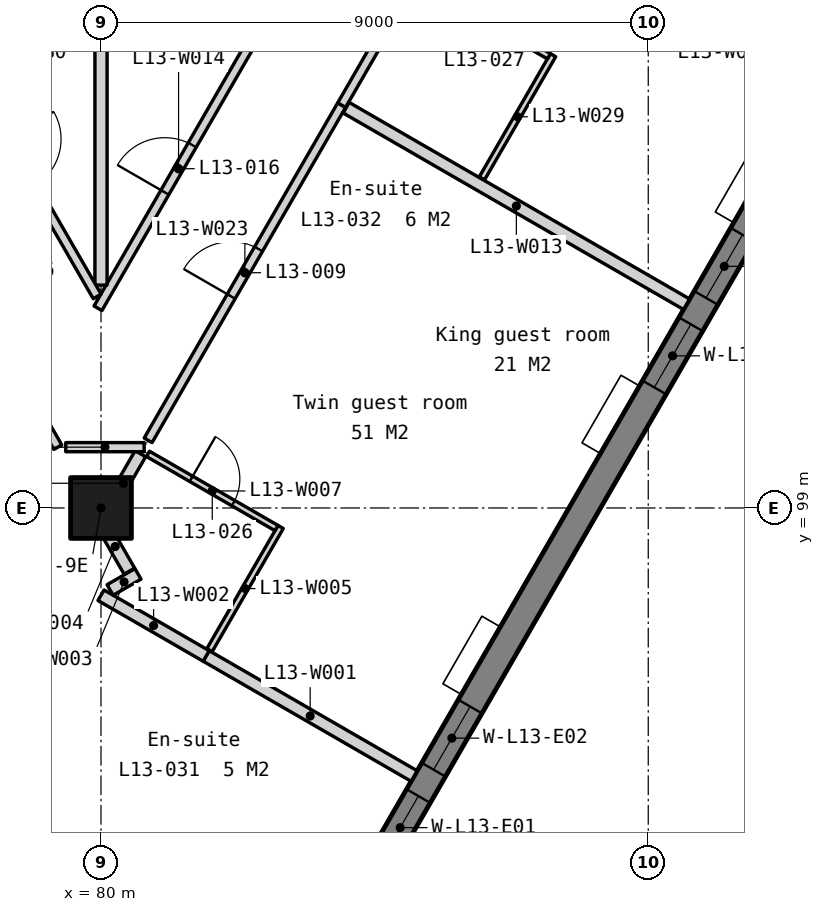
"""IFC4 building model, lengths in metres.
Left out: names, types, materials, properties, quantities, classifications, styles, units other than length and angle.
Written with IfcOpenShell. Run it as: python <this file> out.ifc"""

import sys

from ifc_helpers import new_model, si_unit, direction, frame, frame_2d, origin, origin_2d, place, context, subcontext, project, spatial, polyline, rectangle, outline, extrude, element, fill, save


model = new_model("IFC4")
c1 = context("Model", 3, precision=1e-05, world=origin(), true_north=direction((0.0, 1.0)))
c2 = subcontext(c1, "Body", "Model", "MODEL_VIEW")
j1 = project(units=[si_unit("LENGTHUNIT", "METRE"), si_unit("PLANEANGLEUNIT", "RADIAN")], contexts=[c1])
p1 = place(None, origin())
s1 = spatial("IfcSite", under=j1, at=p1, CompositionType="ELEMENT")
p2 = place(p1, origin())
s2 = spatial("IfcBuilding", under=s1, at=p2, CompositionType="ELEMENT")
p3 = place(p2, frame((0.0, 0.0, 59.5)))
s3 = spatial("IfcBuildingStorey", under=s2, at=p3, CompositionType="ELEMENT", Elevation=59.5)
p4 = place(p3, frame((80.0, 99.0, 0.0), z_axis=(0.0, 0.0, 1.0), x_axis=(1.0, 0.0, 0.0)))
e1 = element("IfcColumn", 1, at=p4, inside=s3, PredefinedType="COLUMN", context=c2, shape_type="SweptSolid", body=[
    extrude(rectangle(XDim=1.0, YDim=1.0, at=origin_2d()), origin(), (0.0, 0.0, 1.0), 3.5),
])
p5 = place(p3, frame((83.105, 90.599, -0.15), z_axis=(0.0, 0.0, 1.0), x_axis=(0.499999201451, 0.866025864826, 0.0)))
e2 = element("IfcWall", 2, at=p5, inside=s3, PredefinedType="SOLIDWALL", context=c2, shape_type="SweptSolid", body=[
    extrude(outline(polyline([(44.8, 0.0), (44.8, 3.5), (0.0, 3.5), (0.0, 0.0), (44.8, 0.0)])), frame((0.0, 0.225, 0.0), z_axis=(0.0, -1.0, 0.0), x_axis=(1.0, 0.0, 0.0)), (0.0, 0.0, 1.0), 0.45),
])
p6 = place(p5, frame((3.03, 0.0, 1.05)))
e3 = element("IfcOpeningElement", 3, at=p6, cuts=e2, PredefinedType="OPENING", context=c2, shape_type="SweptSolid", body=[
    extrude(rectangle(XDim=1.2, YDim=1.5, at=frame_2d((0.6, 0.75))), frame((0.0, 0.235, 0.0), z_axis=(0.0, -1.0, 0.0), x_axis=(1.0, 0.0, 0.0)), (0.0, 0.0, 1.0), 0.47),
])
p7 = place(p5, frame((4.73, 0.0, 1.05)))
e4 = element("IfcOpeningElement", 4, at=p7, cuts=e2, PredefinedType="OPENING", context=c2, shape_type="SweptSolid", body=[
    extrude(rectangle(XDim=1.2, YDim=1.5, at=frame_2d((0.6, 0.75))), frame((0.0, 0.235, 0.0), z_axis=(0.0, -1.0, 0.0), x_axis=(1.0, 0.0, 0.0)), (0.0, 0.0, 1.0), 0.47),
])
p8 = place(p5, frame((11.99, 0.0, 1.05)))
e5 = element("IfcOpeningElement", 5, at=p8, cuts=e2, PredefinedType="OPENING", context=c2, shape_type="SweptSolid", body=[
    extrude(rectangle(XDim=1.2, YDim=1.5, at=frame_2d((0.6, 0.75))), frame((0.0, 0.235, 0.0), z_axis=(0.0, -1.0, 0.0), x_axis=(1.0, 0.0, 0.0)), (0.0, 0.0, 1.0), 0.47),
])
p9 = place(p5, frame((13.69, 0.0, 1.05)))
e6 = element("IfcOpeningElement", 6, at=p9, cuts=e2, PredefinedType="OPENING", context=c2, shape_type="SweptSolid", body=[
    extrude(rectangle(XDim=1.2, YDim=1.5, at=frame_2d((0.6, 0.75))), frame((0.0, 0.235, 0.0), z_axis=(0.0, -1.0, 0.0), x_axis=(1.0, 0.0, 0.0)), (0.0, 0.0, 1.0), 0.47),
])
p10 = place(p5, frame((20.95, 0.0, 1.05)))
e7 = element("IfcOpeningElement", 7, at=p10, cuts=e2, PredefinedType="OPENING", context=c2, shape_type="SweptSolid", body=[
    extrude(rectangle(XDim=1.2, YDim=1.5, at=frame_2d((0.6, 0.75))), frame((0.0, 0.235, 0.0), z_axis=(0.0, -1.0, 0.0), x_axis=(1.0, 0.0, 0.0)), (0.0, 0.0, 1.0), 0.47),
])
p11 = place(p5, frame((22.65, 0.0, 1.05)))
e8 = element("IfcOpeningElement", 8, at=p11, cuts=e2, PredefinedType="OPENING", context=c2, shape_type="SweptSolid", body=[
    extrude(rectangle(XDim=1.2, YDim=1.5, at=frame_2d((0.6, 0.75))), frame((0.0, 0.235, 0.0), z_axis=(0.0, -1.0, 0.0), x_axis=(1.0, 0.0, 0.0)), (0.0, 0.0, 1.0), 0.47),
])
p12 = place(p5, frame((29.91, 0.0, 1.05)))
e9 = element("IfcOpeningElement", 9, at=p12, cuts=e2, PredefinedType="OPENING", context=c2, shape_type="SweptSolid", body=[
    extrude(rectangle(XDim=1.2, YDim=1.5, at=frame_2d((0.6, 0.75))), frame((0.0, 0.235, 0.0), z_axis=(0.0, -1.0, 0.0), x_axis=(1.0, 0.0, 0.0)), (0.0, 0.0, 1.0), 0.47),
])
p13 = place(p5, frame((31.61, 0.0, 1.05)))
e10 = element("IfcOpeningElement", 10, at=p13, cuts=e2, PredefinedType="OPENING", context=c2, shape_type="SweptSolid", body=[
    extrude(rectangle(XDim=1.2, YDim=1.5, at=frame_2d((0.6, 0.75))), frame((0.0, 0.235, 0.0), z_axis=(0.0, -1.0, 0.0), x_axis=(1.0, 0.0, 0.0)), (0.0, 0.0, 1.0), 0.47),
])
p14 = place(p5, frame((38.87, 0.0, 1.05)))
e11 = element("IfcOpeningElement", 11, at=p14, cuts=e2, PredefinedType="OPENING", context=c2, shape_type="SweptSolid", body=[
    extrude(rectangle(XDim=1.2, YDim=1.5, at=frame_2d((0.6, 0.75))), frame((0.0, 0.235, 0.0), z_axis=(0.0, -1.0, 0.0), x_axis=(1.0, 0.0, 0.0)), (0.0, 0.0, 1.0), 0.47),
])
p15 = place(p5, frame((40.57, 0.0, 1.05)))
e12 = element("IfcOpeningElement", 12, at=p15, cuts=e2, PredefinedType="OPENING", context=c2, shape_type="SweptSolid", body=[
    extrude(rectangle(XDim=1.2, YDim=1.5, at=frame_2d((0.6, 0.75))), frame((0.0, 0.235, 0.0), z_axis=(0.0, -1.0, 0.0), x_axis=(1.0, 0.0, 0.0)), (0.0, 0.0, 1.0), 0.47),
])
p16 = place(p3, frame((81.729, 96.566, 0.0), z_axis=(0.0, 0.0, 1.0), x_axis=(0.866020906874, -0.500007788796, 0.0)))
e13 = element("IfcWall", 13, at=p16, inside=s3, PredefinedType="PARTITIONING", context=c2, shape_type="SweptSolid", body=[
    extrude(rectangle(XDim=3.95, YDim=0.2, at=frame_2d((1.975, 0.0))), origin(), (0.0, 0.0, 1.0), 3.35),
])
p17 = place(p3, frame((80.0, 97.565, 0.0), z_axis=(0.0, 0.0, 1.0), x_axis=(0.866022720283, -0.500004647933, 0.0)))
e14 = element("IfcWall", 14, at=p17, inside=s3, PredefinedType="PARTITIONING", context=c2, shape_type="SweptSolid", body=[
    extrude(rectangle(XDim=1.997, YDim=0.2, at=frame_2d((0.999, 0.0))), origin(), (0.0, 0.0, 1.0), 3.35),
])
p18 = place(p3, frame((80.15, 97.651, 0.0), z_axis=(0.0, 0.0, 1.0), x_axis=(0.866078079006, 0.499908752739, 0.0)))
e15 = element("IfcWall", 15, at=p18, inside=s3, PredefinedType="PARTITIONING", context=c2, shape_type="SweptSolid", body=[
    extrude(rectangle(XDim=0.529, YDim=0.2, at=frame_2d((0.265, 0.0))), origin(), (0.0, 0.0, 1.0), 3.35),
])
p19 = place(p3, frame((80.0, 98.771, 0.0), z_axis=(0.0, 0.0, 1.0), x_axis=(0.499624422845, -0.866242134797, 0.0)))
e16 = element("IfcWall", 16, at=p19, inside=s3, PredefinedType="PARTITIONING", context=c2, shape_type="SweptSolid", body=[
    extrude(rectangle(XDim=0.934, YDim=0.2, at=frame_2d((0.467, 0.0))), origin(), (0.0, 0.0, 1.0), 3.35),
])
p20 = place(p3, frame((81.784, 96.661, 0.0), z_axis=(0.0, 0.0, 1.0), x_axis=(0.500077683152, 0.86598054875, 0.0)))
e17 = element("IfcWall", 17, at=p20, inside=s3, PredefinedType="PARTITIONING", context=c2, shape_type="SweptSolid", body=[
    extrude(rectangle(XDim=2.34, YDim=0.1, at=frame_2d((1.17, 0.0))), origin(), (0.0, 0.0, 1.0), 3.35),
])
p21 = place(p3, frame((80.087, 98.921, 0.0), z_axis=(0.0, 0.0, 1.0), x_axis=(0.499929606556, 0.866066041644, 0.0)))
e18 = element("IfcWall", 18, at=p21, inside=s3, PredefinedType="PARTITIONING", context=c2, shape_type="SweptSolid", body=[
    extrude(rectangle(XDim=1.122, YDim=0.2, at=frame_2d((0.561, 0.0))), origin(), (0.0, 0.0, 1.0), 3.35),
])
p22 = place(p3, frame((80.773, 99.89, 0.0), z_axis=(0.0, 0.0, 1.0), x_axis=(0.865980627057, -0.500077547548, 0.0)))
e19 = element("IfcWall", 19, at=p22, inside=s3, PredefinedType="PARTITIONING", context=c2, shape_type="SweptSolid", body=[
    extrude(rectangle(XDim=2.44, YDim=0.1, at=frame_2d((1.22, 0.0))), origin(), (0.0, 0.0, 1.0), 3.35),
])
p23 = place(p22, frame((0.82, 0.0, 0.0)))
e20 = element("IfcOpeningElement", 20, at=p23, cuts=e19, PredefinedType="OPENING", context=c2, shape_type="SweptSolid", body=[
    extrude(rectangle(XDim=0.8, YDim=2.1, at=frame_2d((0.4, 1.05))), frame((0.0, 0.06, 0.0), z_axis=(0.0, -1.0, 0.0), x_axis=(1.0, 0.0, 0.0)), (0.0, 0.0, 1.0), 0.12),
])
p24 = place(p3, frame((76.042, 105.626, 0.0), z_axis=(0.0, 0.0, 1.0), x_axis=(0.499991405182, -0.866030365948, 0.0)))
e21 = element("IfcWall", 21, at=p24, inside=s3, PredefinedType="PARTITIONING", context=c2, shape_type="SweptSolid", body=[
    extrude(rectangle(XDim=6.496, YDim=0.15, at=frame_2d((3.248, 0.0))), origin(), (0.0, 0.0, 1.0), 3.35),
])
p25 = place(p24, frame((2.798, 0.0, 0.0)))
e22 = element("IfcOpeningElement", 22, at=p25, cuts=e21, PredefinedType="OPENING", context=c2, shape_type="SweptSolid", body=[
    extrude(rectangle(XDim=0.9, YDim=2.1, at=frame_2d((0.45, 1.05))), frame((0.0, 0.085, 0.0), z_axis=(0.0, -1.0, 0.0), x_axis=(1.0, 0.0, 0.0)), (0.0, 0.0, 1.0), 0.17),
])
p26 = place(p3, frame((79.42, 100.0, 0.0), z_axis=(0.0, 0.0, 1.0), x_axis=(0.999999982085, -0.000189286387, 0.0)))
e23 = element("IfcWall", 23, at=p26, inside=s3, PredefinedType="PARTITIONING", context=c2, shape_type="SweptSolid", body=[
    extrude(rectangle(XDim=1.29, YDim=0.15, at=frame_2d((0.645, 0.0))), origin(), (0.0, 0.0, 1.0), 3.35),
])
p27 = place(p3, frame((84.031, 105.583, 0.0), z_axis=(0.0, 0.0, 1.0), x_axis=(0.866015162859, -0.500017737384, 0.0)))
e24 = element("IfcWall", 24, at=p27, inside=s3, PredefinedType="PARTITIONING", context=c2, shape_type="SweptSolid", body=[
    extrude(rectangle(XDim=6.465, YDim=0.2, at=frame_2d((3.232, 0.0))), origin(), (0.0, 0.0, 1.0), 3.35),
])
p28 = place(p3, frame((79.95, 102.284, 0.0), z_axis=(0.0, 0.0, 1.0), x_axis=(0.500026712466, 0.866009980786, 0.0)))
e25 = element("IfcWall", 25, at=p28, inside=s3, PredefinedType="PARTITIONING", context=c2, shape_type="SweptSolid", body=[
    extrude(rectangle(XDim=5.302, YDim=0.15, at=frame_2d((2.651, 0.0))), origin(), (0.0, 0.0, 1.0), 3.35),
])
p29 = place(p28, frame((2.201, 0.0, 0.0)))
e26 = element("IfcOpeningElement", 26, at=p29, cuts=e25, PredefinedType="OPENING", context=c2, shape_type="SweptSolid", body=[
    extrude(rectangle(XDim=0.9, YDim=2.1, at=frame_2d((0.45, 1.05))), frame((0.0, 0.085, 0.0), z_axis=(0.0, -1.0, 0.0), x_axis=(1.0, 0.0, 0.0)), (0.0, 0.0, 1.0), 0.17),
])
p30 = place(p3, frame((80.0, 102.666, 0.0), z_axis=(0.0, 0.0, 1.0), x_axis=(0.0, 1.0, 0.0)))
e27 = element("IfcWall", 27, at=p30, inside=s3, PredefinedType="PARTITIONING", context=c2, shape_type="SweptSolid", body=[
    extrude(rectangle(XDim=15.01, YDim=0.2, at=frame_2d((7.505, 0.0))), origin(), (0.0, 0.0, 1.0), 2.801),
])
p31 = place(p3, frame((80.775, 100.113, 0.0), z_axis=(0.0, 0.0, 1.0), x_axis=(0.5000079448, 0.866020816803, 0.0)))
e28 = element("IfcWall", 28, at=p31, inside=s3, PredefinedType="PARTITIONING", context=c2, shape_type="SweptSolid", body=[
    extrude(rectangle(XDim=6.366, YDim=0.15, at=frame_2d((3.183, 0.0))), origin(), (0.0, 0.0, 1.0), 3.35),
])
p32 = place(p31, frame((2.733, 0.0, 0.0)))
e29 = element("IfcOpeningElement", 29, at=p32, cuts=e28, PredefinedType="OPENING", context=c2, shape_type="SweptSolid", body=[
    extrude(rectangle(XDim=0.9, YDim=2.1, at=frame_2d((0.45, 1.05))), frame((0.0, 0.085, 0.0), z_axis=(0.0, -1.0, 0.0), x_axis=(1.0, 0.0, 0.0)), (0.0, 0.0, 1.0), 0.17),
])
p33 = place(p3, frame((83.958, 105.626, 0.0), z_axis=(0.0, 0.0, 1.0), x_axis=(0.500001309137, 0.866024647952, 0.0)))
e30 = element("IfcWall", 30, at=p33, inside=s3, PredefinedType="PARTITIONING", context=c2, shape_type="SweptSolid", body=[
    extrude(rectangle(XDim=2.4, YDim=0.15, at=frame_2d((1.2, 0.0))), origin(), (0.0, 0.0, 1.0), 3.35),
])
p34 = place(p3, frame((88.623, 108.105, 0.0), z_axis=(0.0, 0.0, 1.0), x_axis=(0.866022959057, -0.500004234368, 0.0)))
e31 = element("IfcWall", 31, at=p34, inside=s3, PredefinedType="PARTITIONING", context=c2, shape_type="SweptSolid", body=[
    extrude(rectangle(XDim=3.75, YDim=0.2, at=frame_2d((1.875, 0.0))), origin(), (0.0, 0.0, 1.0), 3.35),
])
p35 = place(p3, frame((86.264, 104.421, 0.0), z_axis=(0.0, 0.0, 1.0), x_axis=(0.500032503492, 0.866006637072, 0.0)))
e32 = element("IfcWall", 32, at=p35, inside=s3, PredefinedType="PARTITIONING", context=c2, shape_type="SweptSolid", body=[
    extrude(rectangle(XDim=2.34, YDim=0.1, at=frame_2d((1.17, 0.0))), origin(), (0.0, 0.0, 1.0), 3.35),
])
p36 = place(p3, frame((77.399, 106.875, 0.0), z_axis=(0.0, 0.0, 1.0), x_axis=(0.500017996867, -0.866015013039, 0.0)))
e33 = element("IfcWall", 33, at=p36, inside=s3, PredefinedType="PARTITIONING", context=c2, shape_type="SweptSolid", body=[
    extrude(rectangle(XDim=5.077, YDim=0.15, at=frame_2d((2.539, 0.0))), origin(), (0.0, 0.0, 1.0), 3.35),
])
p37 = place(p36, frame((2.088, 0.0, 0.0)))
e34 = element("IfcOpeningElement", 34, at=p37, cuts=e33, PredefinedType="OPENING", context=c2, shape_type="SweptSolid", body=[
    extrude(rectangle(XDim=0.9, YDim=2.1, at=frame_2d((0.45, 1.05))), frame((0.0, 0.085, 0.0), z_axis=(0.0, -1.0, 0.0), x_axis=(1.0, 0.0, 0.0)), (0.0, 0.0, 1.0), 0.17),
])
p38 = place(p3, frame((85.231, 107.662, 0.0), z_axis=(0.0, 0.0, 1.0), x_axis=(0.866040446274, -0.499973944738, 0.0)))
e35 = element("IfcWall", 35, at=p38, inside=s3, PredefinedType="PARTITIONING", context=c2, shape_type="SweptSolid", body=[
    extrude(rectangle(XDim=2.465, YDim=0.1, at=frame_2d((1.232, 0.0))), origin(), (0.0, 0.0, 1.0), 3.35),
])
p39 = place(p38, frame((0.833, 0.0, 0.0)))
e36 = element("IfcOpeningElement", 36, at=p39, cuts=e35, PredefinedType="OPENING", context=c2, shape_type="SweptSolid", body=[
    extrude(rectangle(XDim=0.8, YDim=2.1, at=frame_2d((0.4, 1.05))), frame((0.0, 0.06, 0.0), z_axis=(0.0, -1.0, 0.0), x_axis=(1.0, 0.0, 0.0)), (0.0, 0.0, 1.0), 0.12),
])
p40 = place(p6, origin())
e37 = element("IfcWindow", 37, at=p40, inside=s3, PartitioningType="SINGLE_PANEL", PredefinedType="WINDOW", context=c2, shape_type="SweptSolid", body=[
    extrude(rectangle(XDim=1.2, YDim=1.5, at=frame_2d((0.6, 0.75))), frame((0.0, 0.03, 0.0), z_axis=(0.0, -1.0, 0.0), x_axis=(1.0, 0.0, 0.0)), (0.0, 0.0, 1.0), 0.06),
])
fill(e3, e37)
p41 = place(p7, origin())
e38 = element("IfcWindow", 38, at=p41, inside=s3, PartitioningType="SINGLE_PANEL", PredefinedType="WINDOW", context=c2, shape_type="SweptSolid", body=[
    extrude(rectangle(XDim=1.2, YDim=1.5, at=frame_2d((0.6, 0.75))), frame((0.0, 0.03, 0.0), z_axis=(0.0, -1.0, 0.0), x_axis=(1.0, 0.0, 0.0)), (0.0, 0.0, 1.0), 0.06),
])
fill(e4, e38)
p42 = place(p8, origin())
e39 = element("IfcWindow", 39, at=p42, inside=s3, PartitioningType="SINGLE_PANEL", PredefinedType="WINDOW", context=c2, shape_type="SweptSolid", body=[
    extrude(rectangle(XDim=1.2, YDim=1.5, at=frame_2d((0.6, 0.75))), frame((0.0, 0.03, 0.0), z_axis=(0.0, -1.0, 0.0), x_axis=(1.0, 0.0, 0.0)), (0.0, 0.0, 1.0), 0.06),
])
fill(e5, e39)
p43 = place(p9, origin())
e40 = element("IfcWindow", 40, at=p43, inside=s3, PartitioningType="SINGLE_PANEL", PredefinedType="WINDOW", context=c2, shape_type="SweptSolid", body=[
    extrude(rectangle(XDim=1.2, YDim=1.5, at=frame_2d((0.6, 0.75))), frame((0.0, 0.03, 0.0), z_axis=(0.0, -1.0, 0.0), x_axis=(1.0, 0.0, 0.0)), (0.0, 0.0, 1.0), 0.06),
])
fill(e6, e40)
p44 = place(p32, origin())
e41 = element("IfcDoor", 41, at=p44, inside=s3, OperationType="SINGLE_SWING_LEFT", PredefinedType="DOOR", context=c2, shape_type="SweptSolid", body=[
    extrude(rectangle(XDim=0.9, YDim=2.1, at=frame_2d((0.45, 1.05))), frame((0.0, 0.025, 0.0), z_axis=(0.0, -1.0, 0.0), x_axis=(1.0, 0.0, 0.0)), (0.0, 0.0, 1.0), 0.05),
])
fill(e29, e41)
p45 = place(p29, origin())
e42 = element("IfcDoor", 42, at=p45, inside=s3, OperationType="SINGLE_SWING_LEFT", PredefinedType="DOOR", context=c2, shape_type="SweptSolid", body=[
    extrude(rectangle(XDim=0.9, YDim=2.1, at=frame_2d((0.45, 1.05))), frame((0.0, 0.025, 0.0), z_axis=(0.0, -1.0, 0.0), x_axis=(1.0, 0.0, 0.0)), (0.0, 0.0, 1.0), 0.05),
])
fill(e26, e42)
p46 = place(p23, origin())
e43 = element("IfcDoor", 43, at=p46, inside=s3, OperationType="SINGLE_SWING_LEFT", PredefinedType="DOOR", context=c2, shape_type="SweptSolid", body=[
    extrude(rectangle(XDim=0.8, YDim=2.1, at=frame_2d((0.4, 1.05))), frame((0.0, 0.025, 0.0), z_axis=(0.0, -1.0, 0.0), x_axis=(1.0, 0.0, 0.0)), (0.0, 0.0, 1.0), 0.05),
])
fill(e20, e43)
save(model, sys.argv[1])
